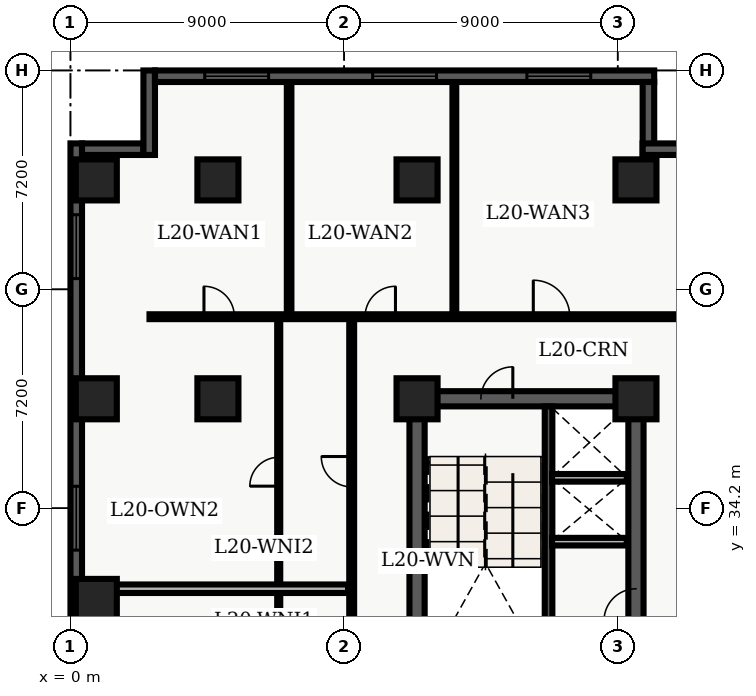
"""IFC4 building model, lengths in metres.
Left out: names, types, materials, properties, quantities, classifications, styles, units other than length and angle.
Written with IfcOpenShell. Run it as: python <this file> out.ifc"""

import sys

from ifc_helpers import new_model, entity, si_unit, converted_unit, direction, frame, origin_with_axes, origin_2d_with_axis, place, context, subcontext, project, spatial, polyline, rectangle, outline, extrude, element, fill, save


model = new_model("IFC4")
c1 = context("Model", 3, precision=1e-05, world=origin_with_axes(), true_north=direction((0.0, 1.0)))
c2 = subcontext(c1, "Body", "Model", "MODEL_VIEW")
j1 = project(units=[si_unit("LENGTHUNIT", "METRE"), converted_unit("PLANEANGLEUNIT", "DEGREE", entity("IfcPlaneAngleMeasure", 0.017), si_unit("PLANEANGLEUNIT", "RADIAN"), dimensions=[0, 0, 0, 0, 0, 0, 0])], contexts=[c1])
p1 = place(None, origin_with_axes())
s1 = spatial("IfcSite", under=j1, at=p1, CompositionType="ELEMENT")
p2 = place(p1, origin_with_axes())
s2 = spatial("IfcBuilding", under=s1, at=p2, CompositionType="ELEMENT")
p3 = place(p2, frame((0.0, 0.0, 84.6), z_axis=(0.0, 0.0, 1.0), x_axis=(1.0, 0.0, 0.0)))
s3 = spatial("IfcBuildingStorey", under=s2, at=p3, CompositionType="ELEMENT", Elevation=84.6)
p4 = place(p3, frame((11.4, 10.8, 0.0), z_axis=(0.0, 0.0, 1.0), x_axis=(0.0, 1.0, 0.0)))
e1 = element("IfcWall", 1, at=p4, inside=s3, PredefinedType="SHEAR", context=c2, shape_type="SweptSolid", body=[
    extrude(outline(polyline([(0.0, -0.25), (27.0, -0.25), (27.0, 0.25), (0.0, 0.25), (0.0, -0.25)])), origin_with_axes(), (0.0, 0.0, 1.0), 4.26),
])
p5 = place(p3, frame((11.4, 37.8, 0.0), z_axis=(0.0, 0.0, 1.0), x_axis=(1.0, 0.0, 0.0)))
e2 = element("IfcWall", 2, at=p5, inside=s3, PredefinedType="SHEAR", context=c2, shape_type="SweptSolid", body=[
    extrude(outline(polyline([(0.0, -0.25), (7.2, -0.25), (7.2, 0.25), (0.0, 0.25), (0.0, -0.25)])), origin_with_axes(), (0.0, 0.0, 1.0), 4.26),
])
p6 = place(p5, frame((2.625, 0.0, 0.0), z_axis=(0.0, 0.0, 1.0), x_axis=(1.0, 0.0, 0.0)))
e3 = element("IfcOpeningElement", 3, at=p6, cuts=e2, PredefinedType="OPENING", context=c2, shape_type="SweptSolid", body=[
    extrude(rectangle(XDim=1.05, YDim=0.52, at=origin_2d_with_axis()), origin_with_axes(), (0.0, 0.0, 1.0), 2.15),
])
p7 = place(p3, frame((18.6, 24.3, 0.0), z_axis=(0.0, 0.0, 1.0), x_axis=(0.0, 1.0, 0.0)))
e4 = element("IfcWall", 4, at=p7, inside=s3, PredefinedType="SHEAR", context=c2, shape_type="SweptSolid", body=[
    extrude(outline(polyline([(0.0, -0.25), (13.5, -0.25), (13.5, 0.25), (0.0, 0.25), (0.0, -0.25)])), origin_with_axes(), (0.0, 0.0, 1.0), 4.26),
])
p8 = place(p7, frame((6.725, 0.0, 0.0), z_axis=(0.0, 0.0, 1.0), x_axis=(1.0, 0.0, 0.0)))
e5 = element("IfcOpeningElement", 5, at=p8, cuts=e4, PredefinedType="OPENING", context=c2, shape_type="SweptSolid", body=[
    extrude(rectangle(XDim=1.05, YDim=0.52, at=origin_2d_with_axis()), origin_with_axes(), (0.0, 0.0, 1.0), 2.15),
])
p9 = place(p3, frame((15.725, 28.9, 0.0), z_axis=(0.0, 0.0, 1.0), x_axis=(0.0, 1.0, 0.0)))
e6 = element("IfcWall", 6, at=p9, inside=s3, PredefinedType="SHEAR", context=c2, shape_type="SweptSolid", body=[
    extrude(outline(polyline([(0.0, -0.125), (8.65, -0.125), (8.65, 0.125), (0.0, 0.125), (0.0, -0.125)])), origin_with_axes(), (0.0, 0.0, 1.0), 4.26),
])
for number, where, z_axis, x_axis in (
    (7, (11.4, 37.8, 0.0), (0.0, 0.0, 1.0), (1.0, 0.0, 0.0)),
    (8, (11.4, 45.0, 0.0), (0.0, 0.0, 1.0), (1.0, 0.0, 0.0)),
    (9, (18.6, 37.8, 0.0), (0.0, 0.0, 1.0), (1.0, 0.0, 0.0)),
    (10, (18.6, 45.0, 0.0), (0.0, 0.0, 1.0), (1.0, 0.0, 0.0)),
    (11, (4.85, 37.8, 0.0), (0.0, 0.0, 1.0), (1.0, 0.0, 0.0)),
    (12, (4.85, 45.0, 0.0), (0.0, 0.0, 1.0), (1.0, 0.0, 0.0)),
    (13, (0.85, 31.2, 0.0), (0.0, 0.0, 1.0), (1.0, 0.0, 0.0)),
    (14, (0.85, 37.8, 0.0), (0.0, 0.0, 1.0), (1.0, 0.0, 0.0)),
    (15, (0.85, 45.0, 0.0), (0.0, 0.0, 1.0), (1.0, 0.0, 0.0)),
):
    element("IfcColumn", number, at=place(p3, frame(where, z_axis=z_axis, x_axis=x_axis)), inside=s3, PredefinedType="COLUMN", context=c2, shape_type="SweptSolid", body=[
        extrude(rectangle(XDim=1.35, YDim=1.35, at=origin_2d_with_axis()), origin_with_axes(), (0.0, 0.0, 1.0), 4.5),
    ])
for number, where, z_axis, x_axis in (
    (16, (15.84, 33.1, 0.0), (0.0, 0.0, 1.0), (1.0, 0.0, 0.0)),
    (17, (15.84, 35.2, 0.0), (0.0, 0.0, 1.0), (1.0, 0.0, 0.0)),
):
    element("IfcWall", number, at=place(p3, frame(where, z_axis=z_axis, x_axis=x_axis)), inside=s3, PredefinedType="SOLIDWALL", context=c2, shape_type="SweptSolid", body=[
        extrude(outline(polyline([(0.0, -0.125), (2.46, -0.125), (2.46, 0.125), (0.0, 0.125), (0.0, -0.125)])), origin_with_axes(), (0.0, 0.0, 1.0), 3.2),
    ])
p10 = place(p3, frame((2.6, 40.5, 0.0), z_axis=(0.0, 0.0, 1.0), x_axis=(1.0, 0.0, 0.0)))
e18 = element("IfcWall", 18, at=p10, inside=s3, PredefinedType="PARTITIONING", context=c2, shape_type="SweptSolid", body=[
    extrude(outline(polyline([(0.0, -0.08), (18.65, -0.08), (18.65, 0.08), (0.0, 0.08), (0.0, -0.08)])), origin_with_axes(), (0.0, 0.0, 1.0), 3.2),
])
p11 = place(p10, frame((2.291, 0.0, 0.0), z_axis=(0.0, 0.0, 1.0), x_axis=(1.0, 0.0, 0.0)))
e19 = element("IfcOpeningElement", 19, at=p11, cuts=e18, PredefinedType="OPENING", context=c2, shape_type="SweptSolid", body=[
    extrude(rectangle(XDim=1.0, YDim=0.18, at=origin_2d_with_axis()), origin_with_axes(), (0.0, 0.0, 1.0), 2.15),
])
p12 = place(p10, frame((7.59, 0.0, 0.0), z_axis=(0.0, 0.0, 1.0), x_axis=(1.0, 0.0, 0.0)))
e20 = element("IfcOpeningElement", 20, at=p12, cuts=e18, PredefinedType="OPENING", context=c2, shape_type="SweptSolid", body=[
    extrude(rectangle(XDim=1.0, YDim=0.18, at=origin_2d_with_axis()), origin_with_axes(), (0.0, 0.0, 1.0), 2.15),
])
p13 = place(p10, frame((13.223, 0.0, 0.0), z_axis=(0.0, 0.0, 1.0), x_axis=(1.0, 0.0, 0.0)))
e21 = element("IfcOpeningElement", 21, at=p13, cuts=e18, PredefinedType="OPENING", context=c2, shape_type="SweptSolid", body=[
    extrude(rectangle(XDim=1.2, YDim=0.18, at=origin_2d_with_axis()), origin_with_axes(), (0.0, 0.0, 1.0), 2.2),
])
p14 = place(p3, frame((9.25, 24.4, 0.0), z_axis=(0.0, 0.0, 1.0), x_axis=(0.0, 1.0, 0.0)))
e22 = element("IfcWall", 22, at=p14, inside=s3, PredefinedType="PARTITIONING", context=c2, shape_type="SweptSolid", body=[
    extrude(outline(polyline([(0.0, -0.08), (16.1, -0.08), (16.1, 0.08), (0.0, 0.08), (0.0, -0.08)])), origin_with_axes(), (0.0, 0.0, 1.0), 3.2),
])
p15 = place(p14, frame((1.966, 0.0, 0.0), z_axis=(0.0, 0.0, 1.0), x_axis=(1.0, 0.0, 0.0)))
e23 = element("IfcOpeningElement", 23, at=p15, cuts=e22, PredefinedType="OPENING", context=c2, shape_type="SweptSolid", body=[
    extrude(rectangle(XDim=1.0, YDim=0.18, at=origin_2d_with_axis()), origin_with_axes(), (0.0, 0.0, 1.0), 2.15),
])
p16 = place(p14, frame((11.001, 0.0, 0.0), z_axis=(0.0, 0.0, 1.0), x_axis=(1.0, 0.0, 0.0)))
e24 = element("IfcOpeningElement", 24, at=p16, cuts=e22, PredefinedType="OPENING", context=c2, shape_type="SweptSolid", body=[
    extrude(rectangle(XDim=1.0, YDim=0.18, at=origin_2d_with_axis()), origin_with_axes(), (0.0, 0.0, 1.0), 2.15),
])
p17 = place(p3, frame((6.85, 24.55, 0.0), z_axis=(0.0, 0.0, 1.0), x_axis=(0.0, 1.0, 0.0)))
e25 = element("IfcWall", 25, at=p17, inside=s3, PredefinedType="PARTITIONING", context=c2, shape_type="SweptSolid", body=[
    extrude(outline(polyline([(0.0, -0.05), (15.75, -0.05), (15.75, 0.05), (0.0, 0.05), (0.0, -0.05)])), origin_with_axes(), (0.0, 0.0, 1.0), 3.2),
])
p18 = place(p17, frame((3.466, 0.0, 0.0), z_axis=(0.0, 0.0, 1.0), x_axis=(1.0, 0.0, 0.0)))
e26 = element("IfcOpeningElement", 26, at=p18, cuts=e25, PredefinedType="OPENING", context=c2, shape_type="SweptSolid", body=[
    extrude(rectangle(XDim=0.95, YDim=0.12, at=origin_2d_with_axis()), origin_with_axes(), (0.0, 0.0, 1.0), 2.15),
])
p19 = place(p17, frame((10.851, 0.0, 0.0), z_axis=(0.0, 0.0, 1.0), x_axis=(1.0, 0.0, 0.0)))
e27 = element("IfcOpeningElement", 27, at=p19, cuts=e25, PredefinedType="OPENING", context=c2, shape_type="SweptSolid", body=[
    extrude(rectangle(XDim=0.95, YDim=0.12, at=origin_2d_with_axis()), origin_with_axes(), (0.0, 0.0, 1.0), 2.15),
])
p20 = place(p3, frame((0.375, 31.552, 0.0), z_axis=(0.0, 0.0, 1.0), x_axis=(1.0, 0.0, 0.0)))
e28 = element("IfcWall", 28, at=p20, inside=s3, PredefinedType="PARTITIONING", context=c2, shape_type="SweptSolid", body=[
    extrude(outline(polyline([(0.0, -0.14), (8.755, -0.14), (8.755, 0.14), (0.0, 0.14), (0.0, -0.14)])), origin_with_axes(), (0.0, 0.0, 1.0), 3.2),
])
p21 = place(p3, frame((7.192, 40.6, 0.0), z_axis=(0.0, 0.0, 1.0), x_axis=(0.0, 1.0, 0.0)))
e29 = element("IfcWall", 29, at=p21, inside=s3, PredefinedType="PARTITIONING", context=c2, shape_type="SweptSolid", body=[
    extrude(outline(polyline([(0.0, -0.075), (7.64, -0.075), (7.64, 0.075), (0.0, 0.075), (0.0, -0.075)])), origin_with_axes(), (0.0, 0.0, 1.0), 3.2),
])
p22 = place(p3, frame((12.627, 40.6, 0.0), z_axis=(0.0, 0.0, 1.0), x_axis=(0.0, 1.0, 0.0)))
e30 = element("IfcWall", 30, at=p22, inside=s3, PredefinedType="PARTITIONING", context=c2, shape_type="SweptSolid", body=[
    extrude(outline(polyline([(0.0, -0.062), (7.64, -0.062), (7.64, 0.062), (0.0, 0.062), (0.0, -0.062)])), origin_with_axes(), (0.0, 0.0, 1.0), 3.2),
])
p23 = place(p3, frame((0.19, 2.78, 0.0), z_axis=(0.0, 0.0, 1.0), x_axis=(0.0, 1.0, 0.0)))
e31 = element("IfcWall", 31, at=p23, inside=s3, PredefinedType="SOLIDWALL", context=c2, shape_type="SweptSolid", body=[
    extrude(outline(polyline([(0.0, -0.19), (43.42, -0.19), (43.42, 0.19), (0.0, 0.19), (0.0, -0.19)])), origin_with_axes(), (0.0, 0.0, 1.0), 4.26),
])
p24 = place(p23, frame((2.946, 0.0, 0.45), z_axis=(0.0, 0.0, 1.0), x_axis=(1.0, 0.0, 0.0)))
e32 = element("IfcOpeningElement", 32, at=p24, cuts=e31, PredefinedType="OPENING", context=c2, shape_type="SweptSolid", body=[
    extrude(rectangle(XDim=2.1, YDim=0.4, at=origin_2d_with_axis()), origin_with_axes(), (0.0, 0.0, 1.0), 2.2),
])
p25 = place(p23, frame((12.328, 0.0, 0.45), z_axis=(0.0, 0.0, 1.0), x_axis=(1.0, 0.0, 0.0)))
e33 = element("IfcOpeningElement", 33, at=p25, cuts=e31, PredefinedType="OPENING", context=c2, shape_type="SweptSolid", body=[
    extrude(rectangle(XDim=2.1, YDim=0.4, at=origin_2d_with_axis()), origin_with_axes(), (0.0, 0.0, 1.0), 2.2),
])
p26 = place(p23, frame((26.401, 0.0, 0.45), z_axis=(0.0, 0.0, 1.0), x_axis=(1.0, 0.0, 0.0)))
e34 = element("IfcOpeningElement", 34, at=p26, cuts=e31, PredefinedType="OPENING", context=c2, shape_type="SweptSolid", body=[
    extrude(rectangle(XDim=2.1, YDim=0.4, at=origin_2d_with_axis()), origin_with_axes(), (0.0, 0.0, 1.0), 2.2),
])
p27 = place(p23, frame((31.092, 0.0, 0.45), z_axis=(0.0, 0.0, 1.0), x_axis=(1.0, 0.0, 0.0)))
e35 = element("IfcOpeningElement", 35, at=p27, cuts=e31, PredefinedType="OPENING", context=c2, shape_type="SweptSolid", body=[
    extrude(rectangle(XDim=2.1, YDim=0.4, at=origin_2d_with_axis()), origin_with_axes(), (0.0, 0.0, 1.0), 2.2),
])
p28 = place(p23, frame((40.024, 0.0, 0.45), z_axis=(0.0, 0.0, 1.0), x_axis=(1.0, 0.0, 0.0)))
e36 = element("IfcOpeningElement", 36, at=p28, cuts=e31, PredefinedType="OPENING", context=c2, shape_type="SweptSolid", body=[
    extrude(rectangle(XDim=2.1, YDim=0.4, at=origin_2d_with_axis()), origin_with_axes(), (0.0, 0.0, 1.0), 2.2),
])
p29 = place(p3, frame((0.38, 46.01, 0.0), z_axis=(0.0, 0.0, 1.0), x_axis=(1.0, 0.0, 0.0)))
e37 = element("IfcWall", 37, at=p29, inside=s3, PredefinedType="SOLIDWALL", context=c2, shape_type="SweptSolid", body=[
    extrude(outline(polyline([(0.0, -0.19), (2.02, -0.19), (2.02, 0.19), (0.0, 0.19), (0.0, -0.19)])), origin_with_axes(), (0.0, 0.0, 1.0), 4.26),
])
p30 = place(p3, frame((2.59, 45.82, 0.0), z_axis=(0.0, 0.0, 1.0), x_axis=(0.0, 1.0, 0.0)))
e38 = element("IfcWall", 38, at=p30, inside=s3, PredefinedType="SOLIDWALL", context=c2, shape_type="SweptSolid", body=[
    extrude(outline(polyline([(0.0, -0.19), (2.78, -0.19), (2.78, 0.19), (0.0, 0.19), (0.0, -0.19)])), origin_with_axes(), (0.0, 0.0, 1.0), 4.26),
])
p31 = place(p3, frame((2.78, 48.41, 0.0), z_axis=(0.0, 0.0, 1.0), x_axis=(1.0, 0.0, 0.0)))
e39 = element("IfcWall", 39, at=p31, inside=s3, PredefinedType="SOLIDWALL", context=c2, shape_type="SweptSolid", body=[
    extrude(outline(polyline([(0.0, -0.19), (16.42, -0.19), (16.42, 0.19), (0.0, 0.19), (0.0, -0.19)])), origin_with_axes(), (0.0, 0.0, 1.0), 4.26),
])
p32 = place(p31, frame((2.687, 0.0, 0.45), z_axis=(0.0, 0.0, 1.0), x_axis=(1.0, 0.0, 0.0)))
e40 = element("IfcOpeningElement", 40, at=p32, cuts=e39, PredefinedType="OPENING", context=c2, shape_type="SweptSolid", body=[
    extrude(rectangle(XDim=2.1, YDim=0.4, at=origin_2d_with_axis()), origin_with_axes(), (0.0, 0.0, 1.0), 2.2),
])
p33 = place(p31, frame((8.21, 0.0, 0.45), z_axis=(0.0, 0.0, 1.0), x_axis=(1.0, 0.0, 0.0)))
e41 = element("IfcOpeningElement", 41, at=p33, cuts=e39, PredefinedType="OPENING", context=c2, shape_type="SweptSolid", body=[
    extrude(rectangle(XDim=2.1, YDim=0.4, at=origin_2d_with_axis()), origin_with_axes(), (0.0, 0.0, 1.0), 2.2),
])
p34 = place(p31, frame((13.283, 0.0, 0.45), z_axis=(0.0, 0.0, 1.0), x_axis=(1.0, 0.0, 0.0)))
e42 = element("IfcOpeningElement", 42, at=p34, cuts=e39, PredefinedType="OPENING", context=c2, shape_type="SweptSolid", body=[
    extrude(rectangle(XDim=2.1, YDim=0.4, at=origin_2d_with_axis()), origin_with_axes(), (0.0, 0.0, 1.0), 2.2),
])
p35 = place(p3, frame((19.01, 48.22, 0.0), z_axis=(0.0, 0.0, 1.0), x_axis=(0.0, -1.0, 0.0)))
e43 = element("IfcWall", 43, at=p35, inside=s3, PredefinedType="SOLIDWALL", context=c2, shape_type="SweptSolid", body=[
    extrude(outline(polyline([(0.0, -0.19), (2.56, -0.19), (2.56, 0.19), (0.0, 0.19), (0.0, -0.19)])), origin_with_axes(), (0.0, 0.0, 1.0), 4.26),
])
p36 = place(p3, frame((18.82, 46.01, 0.0), z_axis=(0.0, 0.0, 1.0), x_axis=(1.0, 0.0, 0.0)))
e44 = element("IfcWall", 44, at=p36, inside=s3, PredefinedType="SOLIDWALL", context=c2, shape_type="SweptSolid", body=[
    extrude(outline(polyline([(0.0, -0.19), (2.78, -0.19), (2.78, 0.19), (0.0, 0.19), (0.0, -0.19)])), origin_with_axes(), (0.0, 0.0, 1.0), 4.26),
])
p37 = place(p5, frame((2.625, 0.0, 0.0), z_axis=(0.0, 0.0, 1.0), x_axis=(1.0, 0.0, 0.0)))
e45 = element("IfcDoor", 45, at=p37, inside=s3, OperationType="SINGLE_SWING_RIGHT", PredefinedType="DOOR", context=c2, shape_type="SweptSolid", body=[
    extrude(rectangle(XDim=1.05, YDim=0.09, at=origin_2d_with_axis()), origin_with_axes(), (0.0, 0.0, 1.0), 2.15),
])
fill(e3, e45)
p38 = place(p7, frame((6.725, 0.0, 0.0), z_axis=(0.0, 0.0, 1.0), x_axis=(1.0, 0.0, 0.0)))
e46 = element("IfcDoor", 46, at=p38, inside=s3, OperationType="SINGLE_SWING_LEFT", PredefinedType="DOOR", context=c2, shape_type="SweptSolid", body=[
    extrude(rectangle(XDim=1.05, YDim=0.09, at=origin_2d_with_axis()), origin_with_axes(), (0.0, 0.0, 1.0), 2.15),
])
fill(e5, e46)
p39 = place(p17, frame((10.851, 0.0, 0.0), z_axis=(0.0, 0.0, 1.0), x_axis=(1.0, 0.0, 0.0)))
e47 = element("IfcDoor", 47, at=p39, inside=s3, OperationType="SINGLE_SWING_LEFT", PredefinedType="DOOR", context=c2, shape_type="SweptSolid", body=[
    extrude(rectangle(XDim=0.95, YDim=0.06, at=origin_2d_with_axis()), origin_with_axes(), (0.0, 0.0, 1.0), 2.15),
])
fill(e27, e47)
p40 = place(p14, frame((11.001, 0.0, 0.0), z_axis=(0.0, 0.0, 1.0), x_axis=(1.0, 0.0, 0.0)))
e48 = element("IfcDoor", 48, at=p40, inside=s3, OperationType="SINGLE_SWING_RIGHT", PredefinedType="DOOR", context=c2, shape_type="SweptSolid", body=[
    extrude(rectangle(XDim=1.0, YDim=0.09, at=origin_2d_with_axis()), origin_with_axes(), (0.0, 0.0, 1.0), 2.15),
])
fill(e24, e48)
p41 = place(p10, frame((2.291, 0.0, 0.0), z_axis=(0.0, 0.0, 1.0), x_axis=(1.0, 0.0, 0.0)))
e49 = element("IfcDoor", 49, at=p41, inside=s3, OperationType="SINGLE_SWING_LEFT", PredefinedType="DOOR", context=c2, shape_type="SweptSolid", body=[
    extrude(rectangle(XDim=1.0, YDim=0.09, at=origin_2d_with_axis()), origin_with_axes(), (0.0, 0.0, 1.0), 2.15),
])
fill(e19, e49)
p42 = place(p10, frame((7.59, 0.0, 0.0), z_axis=(0.0, 0.0, 1.0), x_axis=(1.0, 0.0, 0.0)))
e50 = element("IfcDoor", 50, at=p42, inside=s3, OperationType="SINGLE_SWING_RIGHT", PredefinedType="DOOR", context=c2, shape_type="SweptSolid", body=[
    extrude(rectangle(XDim=1.0, YDim=0.09, at=origin_2d_with_axis()), origin_with_axes(), (0.0, 0.0, 1.0), 2.15),
])
fill(e20, e50)
p43 = place(p10, frame((13.223, 0.0, 0.0), z_axis=(0.0, 0.0, 1.0), x_axis=(1.0, 0.0, 0.0)))
e51 = element("IfcDoor", 51, at=p43, inside=s3, OperationType="SINGLE_SWING_LEFT", PredefinedType="DOOR", context=c2, shape_type="SweptSolid", body=[
    extrude(rectangle(XDim=1.2, YDim=0.09, at=origin_2d_with_axis()), origin_with_axes(), (0.0, 0.0, 1.0), 2.2),
])
fill(e21, e51)
p44 = place(p23, frame((31.092, 0.0, 0.45), z_axis=(0.0, 0.0, 1.0), x_axis=(1.0, 0.0, 0.0)))
e52 = element("IfcWindow", 52, at=p44, inside=s3, PredefinedType="WINDOW", context=c2, shape_type="SweptSolid", body=[
    extrude(rectangle(XDim=2.1, YDim=0.09, at=origin_2d_with_axis()), origin_with_axes(), (0.0, 0.0, 1.0), 2.2),
])
fill(e35, e52)
p45 = place(p23, frame((40.024, 0.0, 0.45), z_axis=(0.0, 0.0, 1.0), x_axis=(1.0, 0.0, 0.0)))
e53 = element("IfcWindow", 53, at=p45, inside=s3, PredefinedType="WINDOW", context=c2, shape_type="SweptSolid", body=[
    extrude(rectangle(XDim=2.1, YDim=0.09, at=origin_2d_with_axis()), origin_with_axes(), (0.0, 0.0, 1.0), 2.2),
])
fill(e36, e53)
p46 = place(p31, frame((2.687, 0.0, 0.45), z_axis=(0.0, 0.0, 1.0), x_axis=(1.0, 0.0, 0.0)))
e54 = element("IfcWindow", 54, at=p46, inside=s3, PredefinedType="WINDOW", context=c2, shape_type="SweptSolid", body=[
    extrude(rectangle(XDim=2.1, YDim=0.09, at=origin_2d_with_axis()), origin_with_axes(), (0.0, 0.0, 1.0), 2.2),
])
fill(e40, e54)
p47 = place(p31, frame((8.21, 0.0, 0.45), z_axis=(0.0, 0.0, 1.0), x_axis=(1.0, 0.0, 0.0)))
e55 = element("IfcWindow", 55, at=p47, inside=s3, PredefinedType="WINDOW", context=c2, shape_type="SweptSolid", body=[
    extrude(rectangle(XDim=2.1, YDim=0.09, at=origin_2d_with_axis()), origin_with_axes(), (0.0, 0.0, 1.0), 2.2),
])
fill(e41, e55)
p48 = place(p31, frame((13.283, 0.0, 0.45), z_axis=(0.0, 0.0, 1.0), x_axis=(1.0, 0.0, 0.0)))
e56 = element("IfcWindow", 56, at=p48, inside=s3, PredefinedType="WINDOW", context=c2, shape_type="SweptSolid", body=[
    extrude(rectangle(XDim=2.1, YDim=0.09, at=origin_2d_with_axis()), origin_with_axes(), (0.0, 0.0, 1.0), 2.2),
])
fill(e42, e56)
save(model, sys.argv[1])
